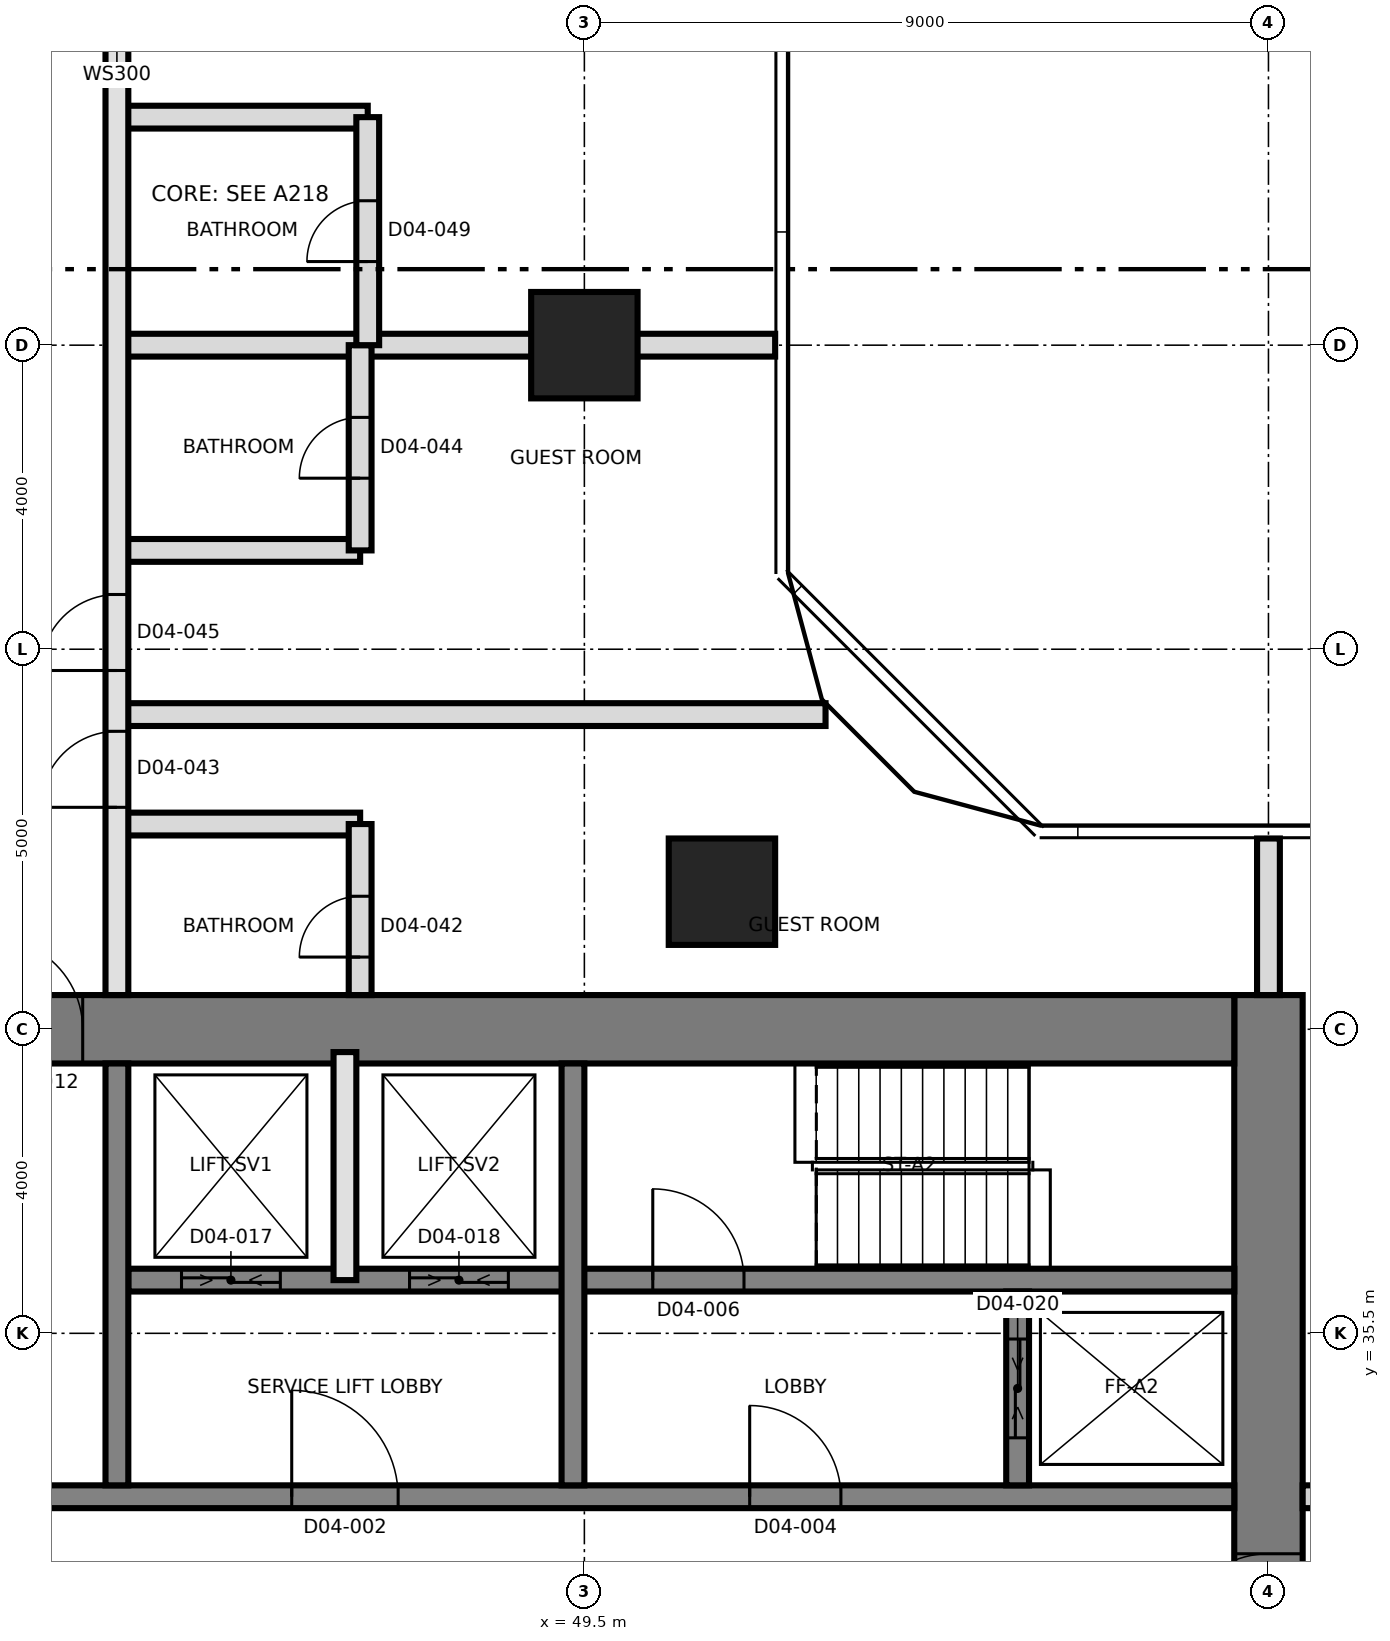
"""IFC4 building model, lengths in metres.
Left out: names, types, materials, properties, quantities, classifications, styles, units other than length and angle.
Written with IfcOpenShell. Run it as: python <this file> out.ifc"""

import sys

from ifc_helpers import new_model, si_unit, direction, frame, frame_2d, origin, origin_2d, place, context, subcontext, project, spatial, rectangle, extrude, element, fill, save


model = new_model("IFC4")
c1 = context("Model", 3, precision=1e-05, world=origin(), true_north=direction((0.0, 1.0)))
c2 = subcontext(c1, "Body", "Model", "MODEL_VIEW")
j1 = project(units=[si_unit("LENGTHUNIT", "METRE"), si_unit("PLANEANGLEUNIT", "RADIAN")], contexts=[c1])
p1 = place(None, origin())
s1 = spatial("IfcSite", under=j1, at=p1, CompositionType="ELEMENT")
p2 = place(p1, origin())
s2 = spatial("IfcBuilding", under=s1, at=p2, CompositionType="ELEMENT")
p3 = place(p2, frame((0.0, 0.0, 66.8)))
s3 = spatial("IfcBuildingStorey", under=s2, at=p3, CompositionType="ELEMENT", Elevation=66.8)
p4 = place(p3, frame((58.5, 21.05, 0.0), z_axis=(0.0, 0.0, 1.0), x_axis=(0.0, 1.0, 0.0)))
e1 = element("IfcWall", 1, at=p4, inside=s3, PredefinedType="SHEAR", context=c2, shape_type="SweptSolid", body=[
    extrude(rectangle(XDim=18.9, YDim=0.9, at=frame_2d((9.45, 0.0))), origin(), (0.0, 0.0, 1.0), 3.7),
])
p5 = place(p4, frame((10.35, 0.0, 0.0)))
e2 = element("IfcOpeningElement", 2, at=p5, cuts=e1, PredefinedType="OPENING", context=c2, shape_type="SweptSolid", body=[
    extrude(rectangle(XDim=1.2, YDim=2.1, at=frame_2d((0.6, 1.05))), frame((0.0, 0.46, 0.0), z_axis=(0.0, -1.0, 0.0), x_axis=(1.0, 0.0, 0.0)), (0.0, 0.0, 1.0), 0.92),
])
p6 = place(p3, frame((31.05, 39.5, 0.0), z_axis=(0.0, 0.0, 1.0), x_axis=(1.0, 0.0, 0.0)))
e3 = element("IfcWall", 3, at=p6, inside=s3, PredefinedType="SHEAR", context=c2, shape_type="SweptSolid", body=[
    extrude(rectangle(XDim=27.0, YDim=0.9, at=frame_2d((13.5, 0.0))), origin(), (0.0, 0.0, 1.0), 3.7),
])
p7 = place(p6, frame((10.65, 0.0, 0.0)))
e4 = element("IfcOpeningElement", 4, at=p7, cuts=e3, PredefinedType="OPENING", context=c2, shape_type="SweptSolid", body=[
    extrude(rectangle(XDim=1.2, YDim=2.1, at=frame_2d((0.6, 1.05))), frame((0.0, 0.46, 0.0), z_axis=(0.0, -1.0, 0.0), x_axis=(1.0, 0.0, 0.0)), (0.0, 0.0, 1.0), 0.92),
])
p8 = place(p3, frame((31.95, 33.35, 0.0), z_axis=(0.0, 0.0, 1.0), x_axis=(1.0, 0.0, 0.0)))
e5 = element("IfcWall", 5, at=p8, inside=s3, PredefinedType="SHEAR", context=c2, shape_type="SweptSolid", body=[
    extrude(rectangle(XDim=26.1, YDim=0.3, at=frame_2d((13.05, 0.0))), origin(), (0.0, 0.0, 1.0), 3.7),
])
p9 = place(p8, frame((13.7, 0.0, 0.0)))
e6 = element("IfcOpeningElement", 6, at=p9, cuts=e5, PredefinedType="OPENING", context=c2, shape_type="SweptSolid", body=[
    extrude(rectangle(XDim=1.4, YDim=2.1, at=frame_2d((0.7, 1.05))), frame((0.0, 0.16, 0.0), z_axis=(0.0, -1.0, 0.0), x_axis=(1.0, 0.0, 0.0)), (0.0, 0.0, 1.0), 0.32),
])
p10 = place(p8, frame((5.175, 0.0, 0.0)))
e7 = element("IfcOpeningElement", 7, at=p10, cuts=e5, PredefinedType="OPENING", context=c2, shape_type="SweptSolid", body=[
    extrude(rectangle(XDim=1.2, YDim=2.1, at=frame_2d((0.6, 1.05))), frame((0.0, 0.16, 0.0), z_axis=(0.0, -1.0, 0.0), x_axis=(1.0, 0.0, 0.0)), (0.0, 0.0, 1.0), 0.32),
])
p11 = place(p8, frame((19.725, 0.0, 0.0)))
e8 = element("IfcOpeningElement", 8, at=p11, cuts=e5, PredefinedType="OPENING", context=c2, shape_type="SweptSolid", body=[
    extrude(rectangle(XDim=1.2, YDim=2.1, at=frame_2d((0.6, 1.05))), frame((0.0, 0.16, 0.0), z_axis=(0.0, -1.0, 0.0), x_axis=(1.0, 0.0, 0.0)), (0.0, 0.0, 1.0), 0.32),
])
p12 = place(p3, frame((43.5, 36.2, 0.0), z_axis=(0.0, 0.0, 1.0), x_axis=(1.0, 0.0, 0.0)))
e9 = element("IfcWall", 9, at=p12, inside=s3, PredefinedType="SHEAR", context=c2, shape_type="SweptSolid", body=[
    extrude(rectangle(XDim=14.55, YDim=0.3, at=frame_2d((7.275, 0.0))), origin(), (0.0, 0.0, 1.0), 3.7),
])
p13 = place(p12, frame((6.9, 0.0, 0.0)))
e10 = element("IfcOpeningElement", 10, at=p13, cuts=e9, PredefinedType="OPENING", context=c2, shape_type="SweptSolid", body=[
    extrude(rectangle(XDim=1.2, YDim=2.1, at=frame_2d((0.6, 1.05))), frame((0.0, 0.16, 0.0), z_axis=(0.0, -1.0, 0.0), x_axis=(1.0, 0.0, 0.0)), (0.0, 0.0, 1.0), 0.32),
])
p14 = place(p12, frame((0.7, 0.0, 0.0)))
e11 = element("IfcOpeningElement", 11, at=p14, cuts=e9, PredefinedType="OPENING", context=c2, shape_type="SweptSolid", body=[
    extrude(rectangle(XDim=1.3, YDim=2.4, at=frame_2d((0.65, 1.2))), frame((0.0, 0.16, 0.0), z_axis=(0.0, -1.0, 0.0), x_axis=(1.0, 0.0, 0.0)), (0.0, 0.0, 1.0), 0.32),
])
p15 = place(p12, frame((3.7, 0.0, 0.0)))
e12 = element("IfcOpeningElement", 12, at=p15, cuts=e9, PredefinedType="OPENING", context=c2, shape_type="SweptSolid", body=[
    extrude(rectangle(XDim=1.3, YDim=2.4, at=frame_2d((0.65, 1.2))), frame((0.0, 0.16, 0.0), z_axis=(0.0, -1.0, 0.0), x_axis=(1.0, 0.0, 0.0)), (0.0, 0.0, 1.0), 0.32),
])
for number, where, z_axis, x_axis in (
    (13, (43.35, 33.5, 0.0), (0.0, 0.0, 1.0), (0.0, 1.0, 0.0)),
    (14, (49.35, 33.5, 0.0), (0.0, 0.0, 1.0), (0.0, 1.0, 0.0)),
):
    element("IfcWall", number, at=place(p3, frame(where, z_axis=z_axis, x_axis=x_axis)), inside=s3, PredefinedType="SHEAR", context=c2, shape_type="SweptSolid", body=[
        extrude(rectangle(XDim=5.55, YDim=0.3, at=frame_2d((2.775, 0.0))), origin(), (0.0, 0.0, 1.0), 3.7),
    ])
p16 = place(p3, frame((55.2, 33.5, 0.0), z_axis=(0.0, 0.0, 1.0), x_axis=(0.0, 1.0, 0.0)))
e15 = element("IfcWall", 15, at=p16, inside=s3, PredefinedType="SHEAR", context=c2, shape_type="SweptSolid", body=[
    extrude(rectangle(XDim=2.55, YDim=0.3, at=frame_2d((1.275, 0.0))), origin(), (0.0, 0.0, 1.0), 3.7),
])
p17 = place(p16, frame((0.625, 0.0, 0.0)))
e16 = element("IfcOpeningElement", 16, at=p17, cuts=e15, PredefinedType="OPENING", context=c2, shape_type="SweptSolid", body=[
    extrude(rectangle(XDim=1.3, YDim=2.4, at=frame_2d((0.65, 1.2))), frame((0.0, 0.16, 0.0), z_axis=(0.0, -1.0, 0.0), x_axis=(1.0, 0.0, 0.0)), (0.0, 0.0, 1.0), 0.32),
])
for number, where, z_axis, x_axis in (
    (17, (51.31, 41.31, 0.0), (0.0, 0.0, 1.0), (1.0, 0.0, 0.0)),
    (18, (49.5, 48.5, 0.0), (0.0, 0.0, 1.0), (1.0, 0.0, 0.0)),
):
    element("IfcColumn", number, at=place(p3, frame(where, z_axis=z_axis, x_axis=x_axis)), inside=s3, PredefinedType="COLUMN", context=c2, shape_type="SweptSolid", body=[
        extrude(rectangle(XDim=1.4, YDim=1.4, at=origin_2d()), origin(), (0.0, 0.0, 1.0), 3.7),
    ])
p18 = place(p3, frame((46.35, 36.2, 0.0), z_axis=(0.0, 0.0, 1.0), x_axis=(0.0, 1.0, 0.0)))
e19 = element("IfcWall", 19, at=p18, inside=s3, PredefinedType="SOLIDWALL", context=c2, shape_type="SweptSolid", body=[
    extrude(rectangle(XDim=3.0, YDim=0.3, at=frame_2d((1.5, 0.0))), origin(), (0.0, 0.0, 1.0), 3.4),
])
p19 = place(p3, frame((58.95, 33.35, 0.0), z_axis=(0.0, 0.0, 1.0), x_axis=(1.0, 0.0, 0.0)))
e20 = element("IfcWall", 20, at=p19, inside=s3, PredefinedType="PARTITIONING", context=c2, shape_type="SweptSolid", body=[
    extrude(rectangle(XDim=26.38, YDim=0.3, at=frame_2d((13.19, 0.0))), origin(), (0.0, 0.0, 1.0), 3.4),
])
p20 = place(p19, frame((1.9, 0.0, 0.0)))
e21 = element("IfcOpeningElement", 21, at=p20, cuts=e20, PredefinedType="OPENING", context=c2, shape_type="SweptSolid", body=[
    extrude(rectangle(XDim=1.0, YDim=2.4, at=frame_2d((0.5, 1.2))), frame((0.0, 0.16, 0.0), z_axis=(0.0, -1.0, 0.0), x_axis=(1.0, 0.0, 0.0)), (0.0, 0.0, 1.0), 0.32),
])
p21 = place(p19, frame((9.685, 0.0, 0.0)))
e22 = element("IfcOpeningElement", 22, at=p21, cuts=e20, PredefinedType="OPENING", context=c2, shape_type="SweptSolid", body=[
    extrude(rectangle(XDim=1.2, YDim=2.1, at=frame_2d((0.6, 1.05))), frame((0.0, 0.16, 0.0), z_axis=(0.0, -1.0, 0.0), x_axis=(1.0, 0.0, 0.0)), (0.0, 0.0, 1.0), 0.32),
])
p22 = place(p19, frame((12.935, 0.0, 0.0)))
e23 = element("IfcOpeningElement", 23, at=p22, cuts=e20, PredefinedType="OPENING", context=c2, shape_type="SweptSolid", body=[
    extrude(rectangle(XDim=1.0, YDim=2.1, at=frame_2d((0.5, 1.05))), frame((0.0, 0.16, 0.0), z_axis=(0.0, -1.0, 0.0), x_axis=(1.0, 0.0, 0.0)), (0.0, 0.0, 1.0), 0.32),
])
p23 = place(p19, frame((18.7, 0.0, 0.0)))
e24 = element("IfcOpeningElement", 24, at=p23, cuts=e20, PredefinedType="OPENING", context=c2, shape_type="SweptSolid", body=[
    extrude(rectangle(XDim=1.0, YDim=2.1, at=frame_2d((0.5, 1.05))), frame((0.0, 0.16, 0.0), z_axis=(0.0, -1.0, 0.0), x_axis=(1.0, 0.0, 0.0)), (0.0, 0.0, 1.0), 0.32),
])
p24 = place(p19, frame((24.55, 0.0, 0.0)))
e25 = element("IfcOpeningElement", 25, at=p24, cuts=e20, PredefinedType="OPENING", context=c2, shape_type="SweptSolid", body=[
    extrude(rectangle(XDim=1.0, YDim=2.1, at=frame_2d((0.5, 1.05))), frame((0.0, 0.16, 0.0), z_axis=(0.0, -1.0, 0.0), x_axis=(1.0, 0.0, 0.0)), (0.0, 0.0, 1.0), 0.32),
])
p25 = place(p3, frame((43.35, 42.2, 0.0), z_axis=(0.0, 0.0, 1.0), x_axis=(1.0, 0.0, 0.0)))
e26 = element("IfcWall", 26, at=p25, inside=s3, PredefinedType="PARTITIONING", context=c2, shape_type="SweptSolid", body=[
    extrude(rectangle(XDim=3.2, YDim=0.3, at=frame_2d((1.6, 0.0))), origin(), (0.0, 0.0, 1.0), 3.4),
])
p26 = place(p3, frame((43.35, 43.64, 0.0), z_axis=(0.0, 0.0, 1.0), x_axis=(1.0, 0.0, 0.0)))
e27 = element("IfcWall", 27, at=p26, inside=s3, PredefinedType="PARTITIONING", context=c2, shape_type="SweptSolid", body=[
    extrude(rectangle(XDim=9.323, YDim=0.3, at=frame_2d((4.662, 0.0))), origin(), (0.0, 0.0, 1.0), 3.35),
])
p27 = place(p3, frame((43.35, 45.8, 0.0), z_axis=(0.0, 0.0, 1.0), x_axis=(1.0, 0.0, 0.0)))
e28 = element("IfcWall", 28, at=p27, inside=s3, PredefinedType="PARTITIONING", context=c2, shape_type="SweptSolid", body=[
    extrude(rectangle(XDim=3.2, YDim=0.3, at=frame_2d((1.6, 0.0))), origin(), (0.0, 0.0, 1.0), 3.4),
])
p28 = place(p3, frame((43.35, 48.5, 0.0), z_axis=(0.0, 0.0, 1.0), x_axis=(1.0, 0.0, 0.0)))
e29 = element("IfcWall", 29, at=p28, inside=s3, PredefinedType="PARTITIONING", context=c2, shape_type="SweptSolid", body=[
    extrude(rectangle(XDim=8.66, YDim=0.3, at=frame_2d((4.33, 0.0))), origin(), (0.0, 0.0, 1.0), 3.35),
])
p29 = place(p3, frame((43.35, 51.5, 0.0), z_axis=(0.0, 0.0, 1.0), x_axis=(1.0, 0.0, 0.0)))
e30 = element("IfcWall", 30, at=p29, inside=s3, PredefinedType="PARTITIONING", context=c2, shape_type="SweptSolid", body=[
    extrude(rectangle(XDim=3.3, YDim=0.3, at=frame_2d((1.65, 0.0))), origin(), (0.0, 0.0, 1.0), 3.4),
])
p30 = place(p3, frame((43.35, 39.95, 0.0), z_axis=(0.0, 0.0, 1.0), x_axis=(0.0, 1.0, 0.0)))
e31 = element("IfcWall", 31, at=p30, inside=s3, PredefinedType="SOLIDWALL", context=c2, shape_type="SweptSolid", body=[
    extrude(rectangle(XDim=25.8, YDim=0.3, at=frame_2d((12.9, 0.0))), origin(), (0.0, 0.0, 1.0), 3.4),
])
p31 = place(p30, frame((2.47, 0.0, 0.0)))
e32 = element("IfcOpeningElement", 32, at=p31, cuts=e31, PredefinedType="OPENING", context=c2, shape_type="SweptSolid", body=[
    extrude(rectangle(XDim=1.0, YDim=2.1, at=frame_2d((0.5, 1.05))), frame((0.0, 0.16, 0.0), z_axis=(0.0, -1.0, 0.0), x_axis=(1.0, 0.0, 0.0)), (0.0, 0.0, 1.0), 0.32),
])
p32 = place(p30, frame((4.27, 0.0, 0.0)))
e33 = element("IfcOpeningElement", 33, at=p32, cuts=e31, PredefinedType="OPENING", context=c2, shape_type="SweptSolid", body=[
    extrude(rectangle(XDim=1.0, YDim=2.1, at=frame_2d((0.5, 1.05))), frame((0.0, 0.16, 0.0), z_axis=(0.0, -1.0, 0.0), x_axis=(1.0, 0.0, 0.0)), (0.0, 0.0, 1.0), 0.32),
])
p33 = place(p30, frame((12.55, 0.0, 0.0)))
e34 = element("IfcOpeningElement", 34, at=p33, cuts=e31, PredefinedType="OPENING", context=c2, shape_type="SweptSolid", body=[
    extrude(rectangle(XDim=1.0, YDim=2.4, at=frame_2d((0.5, 1.2))), frame((0.0, 0.16, 0.0), z_axis=(0.0, -1.0, 0.0), x_axis=(1.0, 0.0, 0.0)), (0.0, 0.0, 1.0), 0.32),
])
p34 = place(p30, frame((19.55, 0.0, 0.0)))
e35 = element("IfcOpeningElement", 35, at=p34, cuts=e31, PredefinedType="OPENING", context=c2, shape_type="SweptSolid", body=[
    extrude(rectangle(XDim=1.0, YDim=2.4, at=frame_2d((0.5, 1.2))), frame((0.0, 0.16, 0.0), z_axis=(0.0, -1.0, 0.0), x_axis=(1.0, 0.0, 0.0)), (0.0, 0.0, 1.0), 0.32),
])
p35 = place(p3, frame((46.55, 39.95, 0.0), z_axis=(0.0, 0.0, 1.0), x_axis=(0.0, 1.0, 0.0)))
e36 = element("IfcWall", 36, at=p35, inside=s3, PredefinedType="PARTITIONING", context=c2, shape_type="SweptSolid", body=[
    extrude(rectangle(XDim=2.25, YDim=0.3, at=frame_2d((1.125, 0.0))), origin(), (0.0, 0.0, 1.0), 3.4),
])
p36 = place(p35, frame((0.5, 0.0, 0.0)))
e37 = element("IfcOpeningElement", 37, at=p36, cuts=e36, PredefinedType="OPENING", context=c2, shape_type="SweptSolid", body=[
    extrude(rectangle(XDim=0.8, YDim=2.1, at=frame_2d((0.4, 1.05))), frame((0.0, 0.16, 0.0), z_axis=(0.0, -1.0, 0.0), x_axis=(1.0, 0.0, 0.0)), (0.0, 0.0, 1.0), 0.32),
])
p37 = place(p3, frame((46.55, 45.8, 0.0), z_axis=(0.0, 0.0, 1.0), x_axis=(0.0, 1.0, 0.0)))
e38 = element("IfcWall", 38, at=p37, inside=s3, PredefinedType="PARTITIONING", context=c2, shape_type="SweptSolid", body=[
    extrude(rectangle(XDim=2.7, YDim=0.3, at=frame_2d((1.35, 0.0))), origin(), (0.0, 0.0, 1.0), 3.4),
])
p38 = place(p37, frame((0.95, 0.0, 0.0)))
e39 = element("IfcOpeningElement", 39, at=p38, cuts=e38, PredefinedType="OPENING", context=c2, shape_type="SweptSolid", body=[
    extrude(rectangle(XDim=0.8, YDim=2.1, at=frame_2d((0.4, 1.05))), frame((0.0, 0.16, 0.0), z_axis=(0.0, -1.0, 0.0), x_axis=(1.0, 0.0, 0.0)), (0.0, 0.0, 1.0), 0.32),
])
p39 = place(p3, frame((46.65, 48.5, 0.0), z_axis=(0.0, 0.0, 1.0), x_axis=(0.0, 1.0, 0.0)))
e40 = element("IfcWall", 40, at=p39, inside=s3, PredefinedType="PARTITIONING", context=c2, shape_type="SweptSolid", body=[
    extrude(rectangle(XDim=3.0, YDim=0.3, at=frame_2d((1.5, 0.0))), origin(), (0.0, 0.0, 1.0), 3.4),
])
p40 = place(p39, frame((1.1, 0.0, 0.0)))
e41 = element("IfcOpeningElement", 41, at=p40, cuts=e40, PredefinedType="OPENING", context=c2, shape_type="SweptSolid", body=[
    extrude(rectangle(XDim=0.8, YDim=2.1, at=frame_2d((0.4, 1.05))), frame((0.0, 0.16, 0.0), z_axis=(0.0, -1.0, 0.0), x_axis=(1.0, 0.0, 0.0)), (0.0, 0.0, 1.0), 0.32),
])
p41 = place(p3, frame((58.5, 39.95, 0.0), z_axis=(0.0, 0.0, 1.0), x_axis=(0.0, 1.0, 0.0)))
e42 = element("IfcWall", 42, at=p41, inside=s3, PredefinedType="PARTITIONING", context=c2, shape_type="SweptSolid", body=[
    extrude(rectangle(XDim=2.06, YDim=0.3, at=frame_2d((1.03, 0.0))), origin(), (0.0, 0.0, 1.0), 3.35),
])
p42 = place(p9, origin())
e43 = element("IfcDoor", 43, at=p42, inside=s3, OperationType="SINGLE_SWING_RIGHT", PredefinedType="DOOR", context=c2, shape_type="SweptSolid", body=[
    extrude(rectangle(XDim=1.4, YDim=2.1, at=frame_2d((0.7, 1.05))), frame((0.0, 0.025, 0.0), z_axis=(0.0, -1.0, 0.0), x_axis=(1.0, 0.0, 0.0)), (0.0, 0.0, 1.0), 0.05),
])
fill(e6, e43)
p43 = place(p11, origin())
e44 = element("IfcDoor", 44, at=p43, inside=s3, OperationType="SINGLE_SWING_RIGHT", PredefinedType="DOOR", context=c2, shape_type="SweptSolid", body=[
    extrude(rectangle(XDim=1.2, YDim=2.1, at=frame_2d((0.6, 1.05))), frame((0.0, 0.025, 0.0), z_axis=(0.0, -1.0, 0.0), x_axis=(1.0, 0.0, 0.0)), (0.0, 0.0, 1.0), 0.05),
])
fill(e8, e44)
p44 = place(p13, origin())
e45 = element("IfcDoor", 45, at=p44, inside=s3, OperationType="SINGLE_SWING_LEFT", PredefinedType="DOOR", context=c2, shape_type="SweptSolid", body=[
    extrude(rectangle(XDim=1.2, YDim=2.1, at=frame_2d((0.6, 1.05))), frame((0.0, 0.025, 0.0), z_axis=(0.0, -1.0, 0.0), x_axis=(1.0, 0.0, 0.0)), (0.0, 0.0, 1.0), 0.05),
])
fill(e10, e45)
p45 = place(p5, origin())
e46 = element("IfcDoor", 46, at=p45, inside=s3, OperationType="SINGLE_SWING_LEFT", PredefinedType="DOOR", context=c2, shape_type="SweptSolid", body=[
    extrude(rectangle(XDim=1.2, YDim=2.1, at=frame_2d((0.6, 1.05))), frame((0.0, 0.025, 0.0), z_axis=(0.0, -1.0, 0.0), x_axis=(1.0, 0.0, 0.0)), (0.0, 0.0, 1.0), 0.05),
])
fill(e2, e46)
p46 = place(p7, origin())
e47 = element("IfcDoor", 47, at=p46, inside=s3, OperationType="SINGLE_SWING_RIGHT", PredefinedType="DOOR", context=c2, shape_type="SweptSolid", body=[
    extrude(rectangle(XDim=1.2, YDim=2.1, at=frame_2d((0.6, 1.05))), frame((0.0, 0.025, 0.0), z_axis=(0.0, -1.0, 0.0), x_axis=(1.0, 0.0, 0.0)), (0.0, 0.0, 1.0), 0.05),
])
fill(e4, e47)
p47 = place(p14, origin())
e48 = element("IfcDoor", 48, at=p47, inside=s3, OperationType="SLIDING_TO_LEFT", PredefinedType="DOOR", context=c2, shape_type="SweptSolid", body=[
    extrude(rectangle(XDim=1.3, YDim=2.4, at=frame_2d((0.65, 1.2))), frame((0.0, 0.025, 0.0), z_axis=(0.0, -1.0, 0.0), x_axis=(1.0, 0.0, 0.0)), (0.0, 0.0, 1.0), 0.05),
])
fill(e11, e48)
p48 = place(p15, origin())
e49 = element("IfcDoor", 49, at=p48, inside=s3, OperationType="SLIDING_TO_LEFT", PredefinedType="DOOR", context=c2, shape_type="SweptSolid", body=[
    extrude(rectangle(XDim=1.3, YDim=2.4, at=frame_2d((0.65, 1.2))), frame((0.0, 0.025, 0.0), z_axis=(0.0, -1.0, 0.0), x_axis=(1.0, 0.0, 0.0)), (0.0, 0.0, 1.0), 0.05),
])
fill(e12, e49)
p49 = place(p17, origin())
e50 = element("IfcDoor", 50, at=p49, inside=s3, OperationType="SLIDING_TO_LEFT", PredefinedType="DOOR", context=c2, shape_type="SweptSolid", body=[
    extrude(rectangle(XDim=1.3, YDim=2.4, at=frame_2d((0.65, 1.2))), frame((0.0, 0.025, 0.0), z_axis=(0.0, -1.0, 0.0), x_axis=(1.0, 0.0, 0.0)), (0.0, 0.0, 1.0), 0.05),
])
fill(e16, e50)
p50 = place(p36, origin())
e51 = element("IfcDoor", 51, at=p50, inside=s3, OperationType="SINGLE_SWING_RIGHT", PredefinedType="DOOR", context=c2, shape_type="SweptSolid", body=[
    extrude(rectangle(XDim=0.8, YDim=2.1, at=frame_2d((0.4, 1.05))), frame((0.0, 0.025, 0.0), z_axis=(0.0, -1.0, 0.0), x_axis=(1.0, 0.0, 0.0)), (0.0, 0.0, 1.0), 0.05),
])
fill(e37, e51)
p51 = place(p31, origin())
e52 = element("IfcDoor", 52, at=p51, inside=s3, OperationType="SINGLE_SWING_LEFT", PredefinedType="DOOR", context=c2, shape_type="SweptSolid", body=[
    extrude(rectangle(XDim=1.0, YDim=2.1, at=frame_2d((0.5, 1.05))), frame((0.0, 0.025, 0.0), z_axis=(0.0, -1.0, 0.0), x_axis=(1.0, 0.0, 0.0)), (0.0, 0.0, 1.0), 0.05),
])
fill(e32, e52)
p52 = place(p38, origin())
e53 = element("IfcDoor", 53, at=p52, inside=s3, OperationType="SINGLE_SWING_LEFT", PredefinedType="DOOR", context=c2, shape_type="SweptSolid", body=[
    extrude(rectangle(XDim=0.8, YDim=2.1, at=frame_2d((0.4, 1.05))), frame((0.0, 0.025, 0.0), z_axis=(0.0, -1.0, 0.0), x_axis=(1.0, 0.0, 0.0)), (0.0, 0.0, 1.0), 0.05),
])
fill(e39, e53)
p53 = place(p32, origin())
e54 = element("IfcDoor", 54, at=p53, inside=s3, OperationType="SINGLE_SWING_LEFT", PredefinedType="DOOR", context=c2, shape_type="SweptSolid", body=[
    extrude(rectangle(XDim=1.0, YDim=2.1, at=frame_2d((0.5, 1.05))), frame((0.0, 0.025, 0.0), z_axis=(0.0, -1.0, 0.0), x_axis=(1.0, 0.0, 0.0)), (0.0, 0.0, 1.0), 0.05),
])
fill(e33, e54)
p54 = place(p40, origin())
e55 = element("IfcDoor", 55, at=p54, inside=s3, OperationType="SINGLE_SWING_LEFT", PredefinedType="DOOR", context=c2, shape_type="SweptSolid", body=[
    extrude(rectangle(XDim=0.8, YDim=2.1, at=frame_2d((0.4, 1.05))), frame((0.0, 0.025, 0.0), z_axis=(0.0, -1.0, 0.0), x_axis=(1.0, 0.0, 0.0)), (0.0, 0.0, 1.0), 0.05),
])
fill(e41, e55)
save(model, sys.argv[1])
